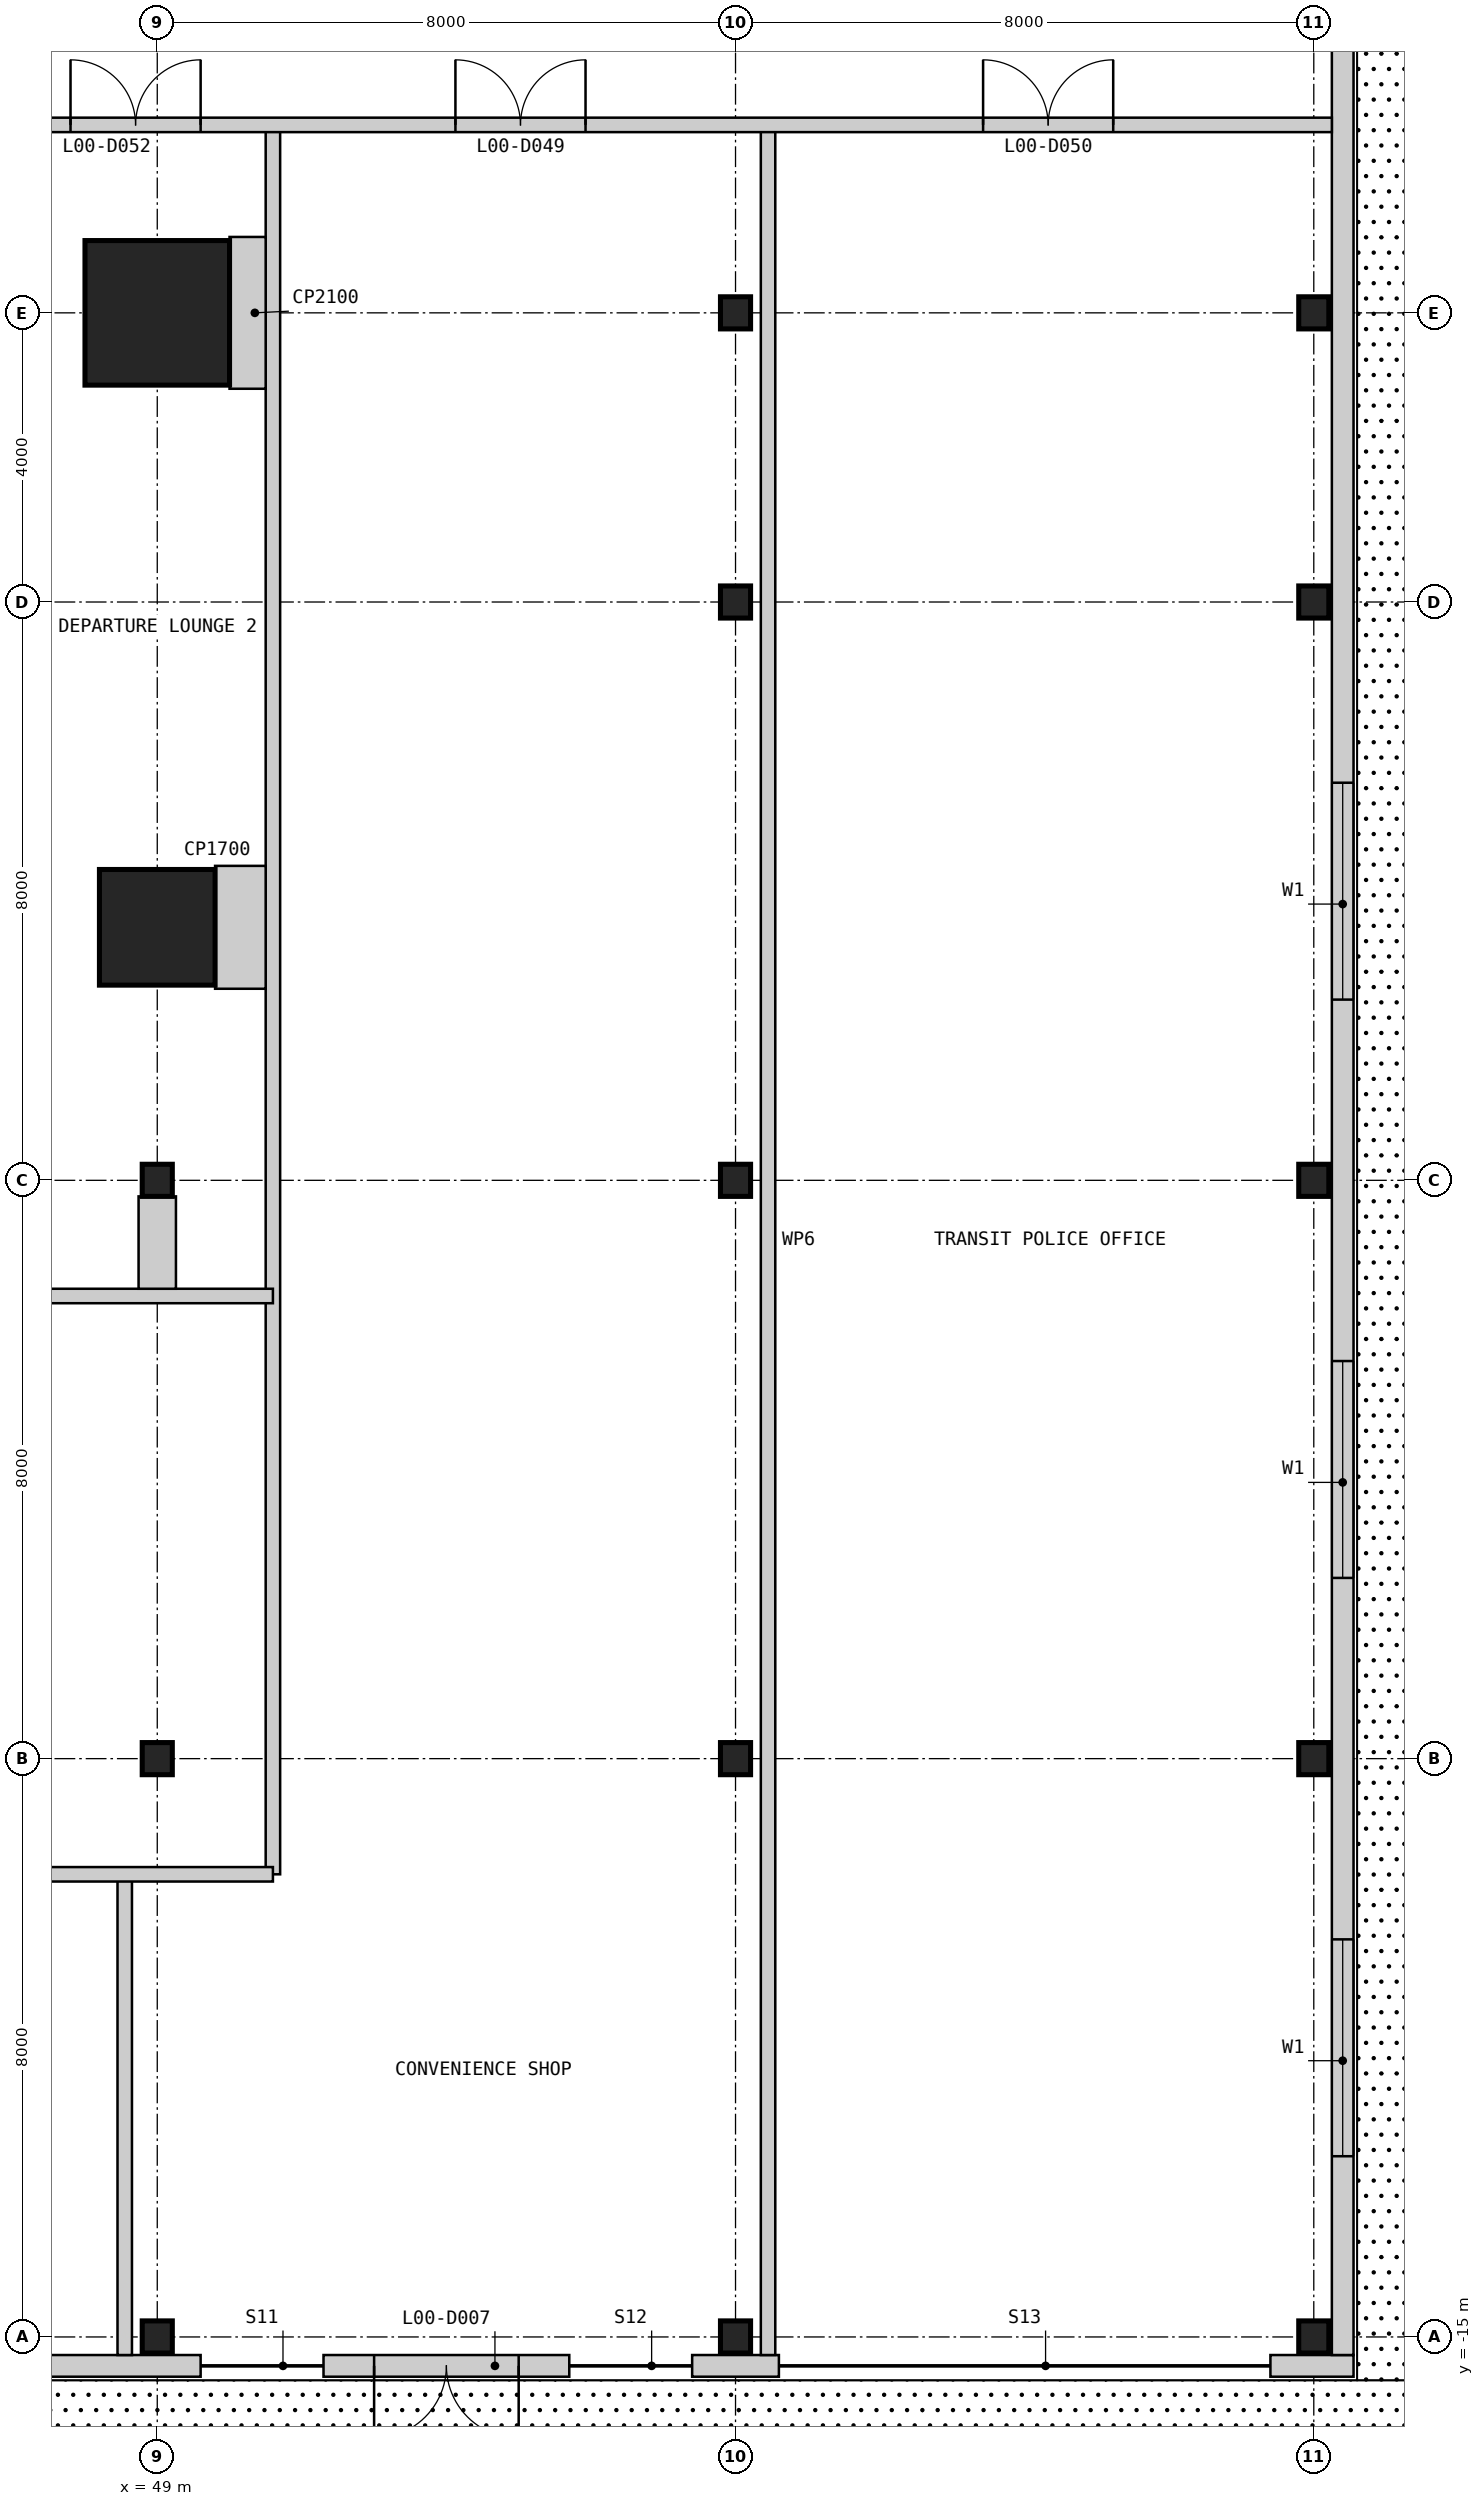
"""IFC4 building model, lengths in metres.
Left out: names, types, materials, properties, quantities, classifications, styles, units other than length and angle.
Written with IfcOpenShell. Run it as: python <this file> out.ifc"""

import sys

from ifc_helpers import new_model, si_unit, direction, frame, frame_2d, origin, origin_2d, place, context, subcontext, project, spatial, rectangle, i_section, extrude, element, fill, save


model = new_model("IFC4")
c1 = context("Model", 3, precision=1e-05, world=origin(), true_north=direction((0.0, 1.0)))
c2 = subcontext(c1, "Body", "Model", "MODEL_VIEW")
j1 = project(units=[si_unit("LENGTHUNIT", "METRE"), si_unit("PLANEANGLEUNIT", "RADIAN")], contexts=[c1])
p1 = place(None, origin())
s1 = spatial("IfcSite", under=j1, at=p1, CompositionType="ELEMENT")
p2 = place(p1, origin())
s2 = spatial("IfcBuilding", under=s1, at=p2, CompositionType="ELEMENT")
p3 = place(p2, origin())
s3 = spatial("IfcBuildingStorey", under=s2, at=p3, CompositionType="ELEMENT", Elevation=0.0)
p4 = place(p3, frame((49.0, 4.5, 0.0), z_axis=(0.0, 0.0, 1.0), x_axis=(1.0, 0.0, 0.0)))
e1 = element("IfcColumn", 1, at=p4, inside=s3, PredefinedType="COLUMN", context=c2, shape_type="SweptSolid", body=[
    extrude(rectangle(XDim=1.6, YDim=1.6, at=origin_2d()), origin(), (0.0, 0.0, 1.0), 7.0),
])
p5 = place(p3, frame((49.0, 13.0, 0.0), z_axis=(0.0, 0.0, 1.0), x_axis=(1.0, 0.0, 0.0)))
e2 = element("IfcColumn", 2, at=p5, inside=s3, PredefinedType="COLUMN", context=c2, shape_type="SweptSolid", body=[
    extrude(rectangle(XDim=2.0, YDim=2.0, at=origin_2d()), origin(), (0.0, 0.0, 1.0), 7.0),
])
p6 = place(p3, frame((49.0, -15.0, -0.3), z_axis=(0.0, 0.0, 1.0), x_axis=(1.0, 0.0, 0.0)))
e3 = element("IfcColumn", 3, at=p6, inside=s3, PredefinedType="COLUMN", context=c2, shape_type="SweptSolid", body=[
    extrude(i_section(OverallWidth=0.417, OverallDepth=0.445, WebThickness=0.039, FlangeThickness=0.063, at=origin_2d()), origin(), (0.0, 0.0, 1.0), 7.3),
])
for number, where, z_axis, x_axis in (
    (4, (49.0, -7.0, 0.0), (0.0, 0.0, 1.0), (1.0, 0.0, 0.0)),
    (5, (49.0, 1.0, 0.0), (0.0, 0.0, 1.0), (1.0, 0.0, 0.0)),
):
    element("IfcColumn", number, at=place(p3, frame(where, z_axis=z_axis, x_axis=x_axis)), inside=s3, PredefinedType="COLUMN", context=c2, shape_type="SweptSolid", body=[
        extrude(i_section(OverallWidth=0.417, OverallDepth=0.445, WebThickness=0.039, FlangeThickness=0.063, at=origin_2d()), origin(), (0.0, 0.0, 1.0), 7.0),
    ])
p7 = place(p3, frame((57.0, -15.0, -0.3), z_axis=(0.0, 0.0, 1.0), x_axis=(1.0, 0.0, 0.0)))
e6 = element("IfcColumn", 6, at=p7, inside=s3, PredefinedType="COLUMN", context=c2, shape_type="SweptSolid", body=[
    extrude(i_section(OverallWidth=0.417, OverallDepth=0.445, WebThickness=0.039, FlangeThickness=0.063, at=origin_2d()), origin(), (0.0, 0.0, 1.0), 7.3),
])
for number, where, z_axis, x_axis in (
    (7, (57.0, -7.0, 0.0), (0.0, 0.0, 1.0), (1.0, 0.0, 0.0)),
    (8, (57.0, 1.0, 0.0), (0.0, 0.0, 1.0), (1.0, 0.0, 0.0)),
    (9, (57.0, 9.0, 0.0), (0.0, 0.0, 1.0), (1.0, 0.0, 0.0)),
    (10, (57.0, 13.0, 0.0), (0.0, 0.0, 1.0), (1.0, 0.0, 0.0)),
):
    element("IfcColumn", number, at=place(p3, frame(where, z_axis=z_axis, x_axis=x_axis)), inside=s3, PredefinedType="COLUMN", context=c2, shape_type="SweptSolid", body=[
        extrude(i_section(OverallWidth=0.417, OverallDepth=0.445, WebThickness=0.039, FlangeThickness=0.063, at=origin_2d()), origin(), (0.0, 0.0, 1.0), 7.0),
    ])
for number, where, z_axis, x_axis in (
    (11, (65.0, -15.0, -0.3), (0.0, 0.0, 1.0), (1.0, 0.0, 0.0)),
    (12, (65.0, -7.0, -0.3), (0.0, 0.0, 1.0), (1.0, 0.0, 0.0)),
    (13, (65.0, 1.0, -0.3), (0.0, 0.0, 1.0), (1.0, 0.0, 0.0)),
    (14, (65.0, 9.0, -0.3), (0.0, 0.0, 1.0), (1.0, 0.0, 0.0)),
    (15, (65.0, 13.0, -0.3), (0.0, 0.0, 1.0), (1.0, 0.0, 0.0)),
):
    element("IfcColumn", number, at=place(p3, frame(where, z_axis=z_axis, x_axis=x_axis)), inside=s3, PredefinedType="COLUMN", context=c2, shape_type="SweptSolid", body=[
        extrude(i_section(OverallWidth=0.417, OverallDepth=0.445, WebThickness=0.039, FlangeThickness=0.063, at=origin_2d()), origin(), (0.0, 0.0, 1.0), 7.3),
    ])
p8 = place(p3, frame((41.4, -15.4, 0.0), z_axis=(0.0, 0.0, 1.0), x_axis=(1.0, 0.0, 0.0)))
e16 = element("IfcWall", 16, at=p8, inside=s3, PredefinedType="SOLIDWALL", context=c2, shape_type="SweptSolid", body=[
    extrude(rectangle(XDim=8.2, YDim=0.3, at=frame_2d((4.1, 0.0))), origin(), (0.0, 0.0, 1.0), 6.7),
])
p9 = place(p8, frame((3.1, 0.0, 0.0)))
e17 = element("IfcOpeningElement", 17, at=p9, cuts=e16, PredefinedType="OPENING", context=c2, shape_type="SweptSolid", body=[
    extrude(rectangle(XDim=2.0, YDim=3.0, at=frame_2d((1.0, 1.5))), frame((0.0, 0.16, 0.0), z_axis=(0.0, -1.0, 0.0), x_axis=(1.0, 0.0, 0.0)), (0.0, 0.0, 1.0), 0.32),
])
p10 = place(p3, frame((51.3, -15.4, 0.0), z_axis=(0.0, 0.0, 1.0), x_axis=(1.0, 0.0, 0.0)))
e18 = element("IfcWall", 18, at=p10, inside=s3, PredefinedType="SOLIDWALL", context=c2, shape_type="SweptSolid", body=[
    extrude(rectangle(XDim=3.4, YDim=0.3, at=frame_2d((1.7, 0.0))), origin(), (0.0, 0.0, 1.0), 6.7),
])
p11 = place(p10, frame((0.7, 0.0, 0.0)))
e19 = element("IfcOpeningElement", 19, at=p11, cuts=e18, PredefinedType="OPENING", context=c2, shape_type="SweptSolid", body=[
    extrude(rectangle(XDim=2.0, YDim=3.0, at=frame_2d((1.0, 1.5))), frame((0.0, 0.16, 0.0), z_axis=(0.0, -1.0, 0.0), x_axis=(1.0, 0.0, 0.0)), (0.0, 0.0, 1.0), 0.32),
])
p12 = place(p3, frame((56.4, -15.4, 0.0), z_axis=(0.0, 0.0, 1.0), x_axis=(1.0, 0.0, 0.0)))
e20 = element("IfcWall", 20, at=p12, inside=s3, PredefinedType="SOLIDWALL", context=c2, shape_type="SweptSolid", body=[
    extrude(rectangle(XDim=1.2, YDim=0.3, at=frame_2d((0.6, 0.0))), origin(), (0.0, 0.0, 1.0), 6.7),
])
p13 = place(p3, frame((64.4, -15.4, 0.0), z_axis=(0.0, 0.0, 1.0), x_axis=(1.0, 0.0, 0.0)))
e21 = element("IfcWall", 21, at=p13, inside=s3, PredefinedType="SOLIDWALL", context=c2, shape_type="SweptSolid", body=[
    extrude(rectangle(XDim=1.15, YDim=0.3, at=frame_2d((0.575, 0.0))), origin(), (0.0, 0.0, 1.0), 6.7),
])
p14 = place(p3, frame((65.4, -15.25, 0.0), z_axis=(0.0, 0.0, 1.0), x_axis=(0.0, 1.0, 0.0)))
e22 = element("IfcWall", 22, at=p14, inside=s3, PredefinedType="SOLIDWALL", context=c2, shape_type="SweptSolid", body=[
    extrude(rectangle(XDim=80.5, YDim=0.3, at=frame_2d((40.25, 0.0))), origin(), (0.0, 0.0, 1.0), 6.7),
])
p15 = place(p14, frame((33.35, 0.0, 0.0)))
e23 = element("IfcOpeningElement", 23, at=p15, cuts=e22, PredefinedType="OPENING", context=c2, shape_type="SweptSolid", body=[
    extrude(rectangle(XDim=1.8, YDim=2.4, at=frame_2d((0.9, 1.2))), frame((0.0, 0.16, 0.0), z_axis=(0.0, -1.0, 0.0), x_axis=(1.0, 0.0, 0.0)), (0.0, 0.0, 1.0), 0.32),
])
p16 = place(p14, frame((45.35, 0.0, 0.0)))
e24 = element("IfcOpeningElement", 24, at=p16, cuts=e22, PredefinedType="OPENING", context=c2, shape_type="SweptSolid", body=[
    extrude(rectangle(XDim=1.8, YDim=2.4, at=frame_2d((0.9, 1.2))), frame((0.0, 0.16, 0.0), z_axis=(0.0, -1.0, 0.0), x_axis=(1.0, 0.0, 0.0)), (0.0, 0.0, 1.0), 0.32),
])
p17 = place(p14, frame((2.75, 0.0, 0.9)))
e25 = element("IfcOpeningElement", 25, at=p17, cuts=e22, PredefinedType="OPENING", context=c2, shape_type="SweptSolid", body=[
    extrude(rectangle(XDim=3.0, YDim=2.4, at=frame_2d((1.5, 1.2))), frame((0.0, 0.16, 0.0), z_axis=(0.0, -1.0, 0.0), x_axis=(1.0, 0.0, 0.0)), (0.0, 0.0, 1.0), 0.32),
])
p18 = place(p14, frame((10.75, 0.0, 0.9)))
e26 = element("IfcOpeningElement", 26, at=p18, cuts=e22, PredefinedType="OPENING", context=c2, shape_type="SweptSolid", body=[
    extrude(rectangle(XDim=3.0, YDim=2.4, at=frame_2d((1.5, 1.2))), frame((0.0, 0.16, 0.0), z_axis=(0.0, -1.0, 0.0), x_axis=(1.0, 0.0, 0.0)), (0.0, 0.0, 1.0), 0.32),
])
p19 = place(p14, frame((18.75, 0.0, 0.9)))
e27 = element("IfcOpeningElement", 27, at=p19, cuts=e22, PredefinedType="OPENING", context=c2, shape_type="SweptSolid", body=[
    extrude(rectangle(XDim=3.0, YDim=2.4, at=frame_2d((1.5, 1.2))), frame((0.0, 0.16, 0.0), z_axis=(0.0, -1.0, 0.0), x_axis=(1.0, 0.0, 0.0)), (0.0, 0.0, 1.0), 0.32),
])
p20 = place(p14, frame((53.25, 0.0, 0.9)))
e28 = element("IfcOpeningElement", 28, at=p20, cuts=e22, PredefinedType="OPENING", context=c2, shape_type="SweptSolid", body=[
    extrude(rectangle(XDim=3.0, YDim=2.4, at=frame_2d((1.5, 1.2))), frame((0.0, 0.16, 0.0), z_axis=(0.0, -1.0, 0.0), x_axis=(1.0, 0.0, 0.0)), (0.0, 0.0, 1.0), 0.32),
])
p21 = place(p14, frame((59.25, 0.0, 0.9)))
e29 = element("IfcOpeningElement", 29, at=p21, cuts=e22, PredefinedType="OPENING", context=c2, shape_type="SweptSolid", body=[
    extrude(rectangle(XDim=3.0, YDim=2.4, at=frame_2d((1.5, 1.2))), frame((0.0, 0.16, 0.0), z_axis=(0.0, -1.0, 0.0), x_axis=(1.0, 0.0, 0.0)), (0.0, 0.0, 1.0), 0.32),
])
p22 = place(p14, frame((66.75, 0.0, 0.9)))
e30 = element("IfcOpeningElement", 30, at=p22, cuts=e22, PredefinedType="OPENING", context=c2, shape_type="SweptSolid", body=[
    extrude(rectangle(XDim=3.0, YDim=2.4, at=frame_2d((1.5, 1.2))), frame((0.0, 0.16, 0.0), z_axis=(0.0, -1.0, 0.0), x_axis=(1.0, 0.0, 0.0)), (0.0, 0.0, 1.0), 0.32),
])
p23 = place(p14, frame((74.75, 0.0, 0.9)))
e31 = element("IfcOpeningElement", 31, at=p23, cuts=e22, PredefinedType="OPENING", context=c2, shape_type="SweptSolid", body=[
    extrude(rectangle(XDim=3.0, YDim=2.4, at=frame_2d((1.5, 1.2))), frame((0.0, 0.16, 0.0), z_axis=(0.0, -1.0, 0.0), x_axis=(1.0, 0.0, 0.0)), (0.0, 0.0, 1.0), 0.32),
])
p24 = place(p3, frame((48.55, -15.25, 0.0), z_axis=(0.0, 0.0, 1.0), x_axis=(0.0, 1.0, 0.0)))
e32 = element("IfcWall", 32, at=p24, inside=s3, PredefinedType="PARTITIONING", context=c2, shape_type="SweptSolid", body=[
    extrude(rectangle(XDim=6.65, YDim=0.2, at=frame_2d((3.325, 0.0))), origin(), (0.0, 0.0, 1.0), 6.7),
])
p25 = place(p3, frame((50.6, -8.6, 0.0), z_axis=(0.0, 0.0, 1.0), x_axis=(0.0, 1.0, 0.0)))
e33 = element("IfcWall", 33, at=p25, inside=s3, PredefinedType="PARTITIONING", context=c2, shape_type="SweptSolid", body=[
    extrude(rectangle(XDim=24.2, YDim=0.2, at=frame_2d((12.1, 0.0))), origin(), (0.0, 0.0, 1.0), 6.7),
])
p26 = place(p3, frame((57.45, -15.25, 0.0), z_axis=(0.0, 0.0, 1.0), x_axis=(0.0, 1.0, 0.0)))
e34 = element("IfcWall", 34, at=p26, inside=s3, PredefinedType="PARTITIONING", context=c2, shape_type="SweptSolid", body=[
    extrude(rectangle(XDim=30.85, YDim=0.2, at=frame_2d((15.425, 0.0))), origin(), (0.0, 0.0, 1.0), 6.7),
])
for number, where, z_axis, x_axis in (
    (35, (34.4, -8.6, 0.0), (0.0, 0.0, 1.0), (1.0, 0.0, 0.0)),
    (36, (34.4, -0.6, 0.0), (0.0, 0.0, 1.0), (1.0, 0.0, 0.0)),
):
    element("IfcWall", number, at=place(p3, frame(where, z_axis=z_axis, x_axis=x_axis)), inside=s3, PredefinedType="PARTITIONING", context=c2, shape_type="SweptSolid", body=[
        extrude(rectangle(XDim=16.2, YDim=0.2, at=frame_2d((8.1, 0.0))), origin(), (0.0, 0.0, 1.0), 6.7),
    ])
p27 = place(p3, frame((43.0, 15.6, 0.0), z_axis=(0.0, 0.0, 1.0), x_axis=(1.0, 0.0, 0.0)))
e37 = element("IfcWall", 37, at=p27, inside=s3, PredefinedType="PARTITIONING", context=c2, shape_type="SweptSolid", body=[
    extrude(rectangle(XDim=22.25, YDim=0.2, at=frame_2d((11.125, 0.0))), origin(), (0.0, 0.0, 1.0), 6.7),
])
p28 = place(p27, frame((10.125, 0.0, 0.0)))
e38 = element("IfcOpeningElement", 38, at=p28, cuts=e37, PredefinedType="OPENING", context=c2, shape_type="SweptSolid", body=[
    extrude(rectangle(XDim=1.8, YDim=2.4, at=frame_2d((0.9, 1.2))), frame((0.0, 0.11, 0.0), z_axis=(0.0, -1.0, 0.0), x_axis=(1.0, 0.0, 0.0)), (0.0, 0.0, 1.0), 0.22),
])
p29 = place(p27, frame((17.425, 0.0, 0.0)))
e39 = element("IfcOpeningElement", 39, at=p29, cuts=e37, PredefinedType="OPENING", context=c2, shape_type="SweptSolid", body=[
    extrude(rectangle(XDim=1.8, YDim=2.4, at=frame_2d((0.9, 1.2))), frame((0.0, 0.11, 0.0), z_axis=(0.0, -1.0, 0.0), x_axis=(1.0, 0.0, 0.0)), (0.0, 0.0, 1.0), 0.22),
])
p30 = place(p27, frame((1.025, 0.0, 0.0)))
e40 = element("IfcOpeningElement", 40, at=p30, cuts=e37, PredefinedType="OPENING", context=c2, shape_type="SweptSolid", body=[
    extrude(rectangle(XDim=1.8, YDim=2.4, at=frame_2d((0.9, 1.2))), frame((0.0, 0.11, 0.0), z_axis=(0.0, -1.0, 0.0), x_axis=(1.0, 0.0, 0.0)), (0.0, 0.0, 1.0), 0.22),
])
p31 = place(p27, frame((4.8, 0.0, 0.0)))
e41 = element("IfcOpeningElement", 41, at=p31, cuts=e37, PredefinedType="OPENING", context=c2, shape_type="SweptSolid", body=[
    extrude(rectangle(XDim=1.8, YDim=2.4, at=frame_2d((0.9, 1.2))), frame((0.0, 0.11, 0.0), z_axis=(0.0, -1.0, 0.0), x_axis=(1.0, 0.0, 0.0)), (0.0, 0.0, 1.0), 0.22),
])
p32 = place(p3, frame((50.5, 4.5, 0.0), z_axis=(0.0, 0.0, 1.0), x_axis=(-1.0, 0.0, 0.0)))
e42 = element("IfcWall", 42, at=p32, inside=s3, PredefinedType="PARTITIONING", context=c2, shape_type="SweptSolid", body=[
    extrude(rectangle(XDim=0.7, YDim=1.7, at=frame_2d((0.35, 0.0))), origin(), (0.0, 0.0, 1.0), 6.7),
])
p33 = place(p3, frame((50.5, 13.0, 0.0), z_axis=(0.0, 0.0, 1.0), x_axis=(-1.0, 0.0, 0.0)))
e43 = element("IfcWall", 43, at=p33, inside=s3, PredefinedType="PARTITIONING", context=c2, shape_type="SweptSolid", body=[
    extrude(rectangle(XDim=0.5, YDim=2.1, at=frame_2d((0.25, 0.0))), origin(), (0.0, 0.0, 1.0), 6.7),
])
p34 = place(p3, frame((49.0, -0.5, 0.0), z_axis=(0.0, 0.0, 1.0), x_axis=(0.0, 1.0, 0.0)))
e44 = element("IfcWall", 44, at=p34, inside=s3, PredefinedType="PARTITIONING", context=c2, shape_type="SweptSolid", body=[
    extrude(rectangle(XDim=1.278, YDim=0.517, at=frame_2d((0.639, 0.0))), origin(), (0.0, 0.0, 1.0), 5.954),
])
p35 = place(p11, frame((2.0, 0.0, 0.0), z_axis=(0.0, 0.0, 1.0), x_axis=(-1.0, 0.0, 0.0)))
e45 = element("IfcDoor", 45, at=p35, inside=s3, OperationType="DOUBLE_DOOR_SINGLE_SWING", PredefinedType="DOOR", context=c2, shape_type="SweptSolid", body=[
    extrude(rectangle(XDim=2.0, YDim=3.0, at=frame_2d((1.0, 1.5))), frame((0.0, 0.025, 0.0), z_axis=(0.0, -1.0, 0.0), x_axis=(1.0, 0.0, 0.0)), (0.0, 0.0, 1.0), 0.05),
])
fill(e19, e45)
p36 = place(p17, origin())
e46 = element("IfcWindow", 46, at=p36, inside=s3, PartitioningType="SINGLE_PANEL", PredefinedType="WINDOW", context=c2, shape_type="SweptSolid", body=[
    extrude(rectangle(XDim=3.0, YDim=2.4, at=frame_2d((1.5, 1.2))), frame((0.0, 0.03, 0.0), z_axis=(0.0, -1.0, 0.0), x_axis=(1.0, 0.0, 0.0)), (0.0, 0.0, 1.0), 0.06),
])
fill(e25, e46)
p37 = place(p18, origin())
e47 = element("IfcWindow", 47, at=p37, inside=s3, PartitioningType="SINGLE_PANEL", PredefinedType="WINDOW", context=c2, shape_type="SweptSolid", body=[
    extrude(rectangle(XDim=3.0, YDim=2.4, at=frame_2d((1.5, 1.2))), frame((0.0, 0.03, 0.0), z_axis=(0.0, -1.0, 0.0), x_axis=(1.0, 0.0, 0.0)), (0.0, 0.0, 1.0), 0.06),
])
fill(e26, e47)
p38 = place(p19, origin())
e48 = element("IfcWindow", 48, at=p38, inside=s3, PartitioningType="SINGLE_PANEL", PredefinedType="WINDOW", context=c2, shape_type="SweptSolid", body=[
    extrude(rectangle(XDim=3.0, YDim=2.4, at=frame_2d((1.5, 1.2))), frame((0.0, 0.03, 0.0), z_axis=(0.0, -1.0, 0.0), x_axis=(1.0, 0.0, 0.0)), (0.0, 0.0, 1.0), 0.06),
])
fill(e27, e48)
p39 = place(p28, origin())
e49 = element("IfcDoor", 49, at=p39, inside=s3, OperationType="DOUBLE_DOOR_SINGLE_SWING", PredefinedType="DOOR", context=c2, shape_type="SweptSolid", body=[
    extrude(rectangle(XDim=1.8, YDim=2.4, at=frame_2d((0.9, 1.2))), frame((0.0, 0.025, 0.0), z_axis=(0.0, -1.0, 0.0), x_axis=(1.0, 0.0, 0.0)), (0.0, 0.0, 1.0), 0.05),
])
fill(e38, e49)
p40 = place(p29, origin())
e50 = element("IfcDoor", 50, at=p40, inside=s3, OperationType="DOUBLE_DOOR_SINGLE_SWING", PredefinedType="DOOR", context=c2, shape_type="SweptSolid", body=[
    extrude(rectangle(XDim=1.8, YDim=2.4, at=frame_2d((0.9, 1.2))), frame((0.0, 0.025, 0.0), z_axis=(0.0, -1.0, 0.0), x_axis=(1.0, 0.0, 0.0)), (0.0, 0.0, 1.0), 0.05),
])
fill(e39, e50)
p41 = place(p31, origin())
e51 = element("IfcDoor", 51, at=p41, inside=s3, OperationType="DOUBLE_DOOR_SINGLE_SWING", PredefinedType="DOOR", context=c2, shape_type="SweptSolid", body=[
    extrude(rectangle(XDim=1.8, YDim=2.4, at=frame_2d((0.9, 1.2))), frame((0.0, 0.025, 0.0), z_axis=(0.0, -1.0, 0.0), x_axis=(1.0, 0.0, 0.0)), (0.0, 0.0, 1.0), 0.05),
])
fill(e41, e51)
save(model, sys.argv[1])
